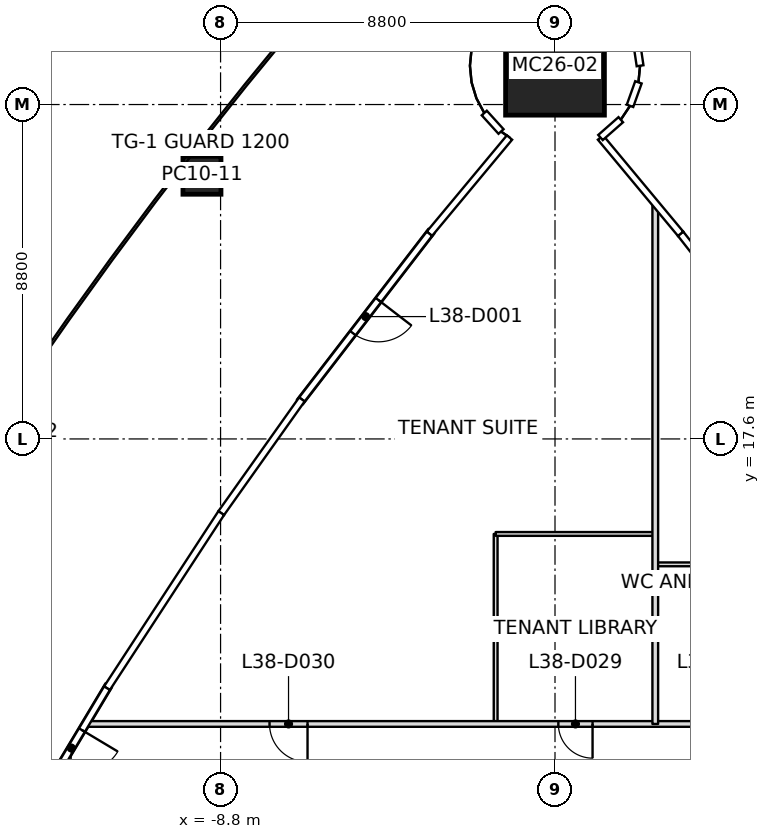
"""IFC4 building model, lengths in metres.
Left out: names, types, materials, properties, quantities, classifications, styles, units other than length and angle.
Written with IfcOpenShell. Run it as: python <this file> out.ifc"""

import sys

from ifc_helpers import new_model, si_unit, direction, frame, frame_2d, origin, origin_2d, place, context, subcontext, project, spatial, rectangle, extrude, element, fill, save


model = new_model("IFC4")
c1 = context("Model", 3, precision=1e-05, world=origin(), true_north=direction((0.0, 1.0)))
c2 = subcontext(c1, "Body", "Model", "MODEL_VIEW")
j1 = project(units=[si_unit("LENGTHUNIT", "METRE"), si_unit("PLANEANGLEUNIT", "RADIAN")], contexts=[c1])
p1 = place(None, origin())
s1 = spatial("IfcSite", under=j1, at=p1, CompositionType="ELEMENT")
p2 = place(p1, origin())
s2 = spatial("IfcBuilding", under=s1, at=p2, CompositionType="ELEMENT")
p3 = place(p2, frame((0.0, 0.0, 173.8)))
s3 = spatial("IfcBuildingStorey", under=s2, at=p3, CompositionType="ELEMENT", Elevation=173.8)
p4 = place(p3, frame((0.0, 27.421, 0.0), z_axis=(0.0, -0.032331720729, 0.999477193254), x_axis=(1.0, 0.0, 0.0)))
e1 = element("IfcColumn", 1, at=p4, inside=s3, PredefinedType="COLUMN", context=c2, shape_type="SweptSolid", body=[
    extrude(rectangle(XDim=2.6, YDim=2.6, at=origin_2d()), origin(), (0.0, 0.0, 1.0), 4.002),
])
p5 = place(p3, frame((-9.29, 24.539, 0.0), z_axis=(0.0002440896, -0.020442503975, 0.999791000385), x_axis=(0.611997816063, 0.790697226077, 0.016017796599)))
e2 = element("IfcColumn", 2, at=p5, inside=s3, PredefinedType="COLUMN", context=c2, shape_type="SweptSolid", body=[
    extrude(rectangle(XDim=1.0, YDim=1.0, at=origin_2d()), origin(), (0.0, 0.0, 1.0), 4.001),
])
p6 = place(p3, frame((-3.25, 23.071, 0.0), z_axis=(0.0, 0.0, 1.0), x_axis=(-0.609922556237, -0.792461024526, 0.0)))
e3 = element("IfcWall", 3, at=p6, inside=s3, PredefinedType="SOLIDWALL", context=c2, shape_type="SweptSolid", body=[
    extrude(rectangle(XDim=5.682, YDim=0.2, at=frame_2d((2.841, 0.0))), origin(), (0.0, 0.0, 1.0), 3.34),
])
p7 = place(p6, frame((2.291, 0.0, 0.0)))
e4 = element("IfcOpeningElement", 4, at=p7, cuts=e3, PredefinedType="OPENING", context=c2, shape_type="SweptSolid", body=[
    extrude(rectangle(XDim=1.1, YDim=2.1, at=frame_2d((0.55, 1.05))), frame((0.0, 0.1, 0.0), z_axis=(0.0, -1.0, 0.0), x_axis=(1.0, 0.0, 0.0)), (0.0, 0.0, 1.0), 0.2),
])
p8 = place(p3, frame((-11.742, 11.118, 0.0), z_axis=(0.0, 0.0, 1.0), x_axis=(-0.513422332631, -0.858136066341, 0.0)))
e5 = element("IfcWall", 5, at=p8, inside=s3, PredefinedType="SOLIDWALL", context=c2, shape_type="SweptSolid", body=[
    extrude(rectangle(XDim=3.848, YDim=0.2, at=frame_2d((1.924, 0.0))), origin(), (0.0, 0.0, 1.0), 3.34),
])
p9 = place(p8, frame((1.374, 0.0, 0.0)))
e6 = element("IfcOpeningElement", 6, at=p9, cuts=e5, PredefinedType="OPENING", context=c2, shape_type="SweptSolid", body=[
    extrude(rectangle(XDim=1.1, YDim=2.1, at=frame_2d((0.55, 1.05))), frame((0.0, 0.1, 0.0), z_axis=(0.0, -1.0, 0.0), x_axis=(1.0, 0.0, 0.0)), (0.0, 0.0, 1.0), 0.2),
])
p10 = place(p3, frame((2.638, 10.1, 0.0), z_axis=(0.0, 0.0, 1.0), x_axis=(0.0, 1.0, 0.0)))
e7 = element("IfcWall", 7, at=p10, inside=s3, PredefinedType="PARTITIONING", context=c2, shape_type="SweptSolid", body=[
    extrude(rectangle(XDim=13.711, YDim=0.15, at=frame_2d((6.856, 0.0))), origin(), (0.0, 0.0, 1.0), 3.247),
])
p11 = place(p3, frame((13.02, 10.1, 0.0), z_axis=(0.0, 0.0, 1.0), x_axis=(-1.0, 0.0, 0.0)))
e8 = element("IfcWall", 8, at=p11, inside=s3, PredefinedType="PARTITIONING", context=c2, shape_type="SweptSolid", body=[
    extrude(rectangle(XDim=25.382, YDim=0.15, at=frame_2d((12.691, 0.0))), origin(), (0.0, 0.0, 1.0), 3.166),
])
p12 = place(p11, frame((8.132, 0.0, 0.0)))
e9 = element("IfcOpeningElement", 9, at=p12, cuts=e8, PredefinedType="OPENING", context=c2, shape_type="SweptSolid", body=[
    extrude(rectangle(XDim=0.9, YDim=2.1, at=frame_2d((0.45, 1.05))), frame((0.0, 0.075, 0.0), z_axis=(0.0, -1.0, 0.0), x_axis=(1.0, 0.0, 0.0)), (0.0, 0.0, 1.0), 0.15),
])
p13 = place(p11, frame((2.791, 0.0, 0.0)))
e10 = element("IfcOpeningElement", 10, at=p13, cuts=e8, PredefinedType="OPENING", context=c2, shape_type="SweptSolid", body=[
    extrude(rectangle(XDim=1.0, YDim=2.1, at=frame_2d((0.5, 1.05))), frame((0.0, 0.075, 0.0), z_axis=(0.0, -1.0, 0.0), x_axis=(1.0, 0.0, 0.0)), (0.0, 0.0, 1.0), 0.15),
])
p14 = place(p11, frame((12.032, 0.0, 0.0)))
e11 = element("IfcOpeningElement", 11, at=p14, cuts=e8, PredefinedType="OPENING", context=c2, shape_type="SweptSolid", body=[
    extrude(rectangle(XDim=0.9, YDim=2.1, at=frame_2d((0.45, 1.05))), frame((0.0, 0.075, 0.0), z_axis=(0.0, -1.0, 0.0), x_axis=(1.0, 0.0, 0.0)), (0.0, 0.0, 1.0), 0.15),
])
p15 = place(p11, frame((19.532, 0.0, 0.0)))
e12 = element("IfcOpeningElement", 12, at=p15, cuts=e8, PredefinedType="OPENING", context=c2, shape_type="SweptSolid", body=[
    extrude(rectangle(XDim=1.0, YDim=2.1, at=frame_2d((0.5, 1.05))), frame((0.0, 0.075, 0.0), z_axis=(0.0, -1.0, 0.0), x_axis=(1.0, 0.0, 0.0)), (0.0, 0.0, 1.0), 0.15),
])
p16 = place(p3, frame((-1.562, 10.13, 0.0), z_axis=(0.0, 0.0, 1.0), x_axis=(0.0, 1.0, 0.0)))
e13 = element("IfcWall", 13, at=p16, inside=s3, PredefinedType="PARTITIONING", context=c2, shape_type="SweptSolid", body=[
    extrude(rectangle(XDim=4.97, YDim=0.1, at=frame_2d((2.485, 0.0))), origin(), (0.0, 0.0, 1.0), 3.247),
])
p17 = place(p3, frame((-1.562, 15.1, 0.0), z_axis=(0.0, 0.0, 1.0), x_axis=(1.0, 0.0, 0.0)))
e14 = element("IfcWall", 14, at=p17, inside=s3, PredefinedType="PARTITIONING", context=c2, shape_type="SweptSolid", body=[
    extrude(rectangle(XDim=4.17, YDim=0.1, at=frame_2d((2.085, 0.0))), origin(), (0.0, 0.0, 1.0), 3.166),
])
p18 = place(p3, frame((2.668, 14.3, 0.0), z_axis=(0.0, 0.0, 1.0), x_axis=(1.0, 0.0, 0.0)))
e15 = element("IfcWall", 15, at=p18, inside=s3, PredefinedType="PARTITIONING", context=c2, shape_type="SweptSolid", body=[
    extrude(rectangle(XDim=3.57, YDim=0.1, at=frame_2d((1.785, 0.0))), origin(), (0.0, 0.0, 1.0), 3.247),
])
p19 = place(p7, origin())
e16 = element("IfcDoor", 16, at=p19, inside=s3, OperationType="SINGLE_SWING_RIGHT", PredefinedType="DOOR", context=c2, shape_type="SweptSolid", body=[
    extrude(rectangle(XDim=1.1, YDim=2.1, at=frame_2d((0.55, 1.05))), frame((0.0, 0.025, 0.0), z_axis=(0.0, -1.0, 0.0), x_axis=(1.0, 0.0, 0.0)), (0.0, 0.0, 1.0), 0.05),
])
fill(e4, e16)
p20 = place(p9, origin())
e17 = element("IfcDoor", 17, at=p20, inside=s3, OperationType="SINGLE_SWING_LEFT", PredefinedType="DOOR", context=c2, shape_type="SweptSolid", body=[
    extrude(rectangle(XDim=1.1, YDim=2.1, at=frame_2d((0.55, 1.05))), frame((0.0, 0.025, 0.0), z_axis=(0.0, -1.0, 0.0), x_axis=(1.0, 0.0, 0.0)), (0.0, 0.0, 1.0), 0.05),
])
fill(e6, e17)
p21 = place(p14, origin())
e18 = element("IfcDoor", 18, at=p21, inside=s3, OperationType="SINGLE_SWING_LEFT", PredefinedType="DOOR", context=c2, shape_type="SweptSolid", body=[
    extrude(rectangle(XDim=0.9, YDim=2.1, at=frame_2d((0.45, 1.05))), frame((0.0, 0.025, 0.0), z_axis=(0.0, -1.0, 0.0), x_axis=(1.0, 0.0, 0.0)), (0.0, 0.0, 1.0), 0.05),
])
fill(e11, e18)
p22 = place(p15, origin())
e19 = element("IfcDoor", 19, at=p22, inside=s3, OperationType="SINGLE_SWING_RIGHT", PredefinedType="DOOR", context=c2, shape_type="SweptSolid", body=[
    extrude(rectangle(XDim=1.0, YDim=2.1, at=frame_2d((0.5, 1.05))), frame((0.0, 0.025, 0.0), z_axis=(0.0, -1.0, 0.0), x_axis=(1.0, 0.0, 0.0)), (0.0, 0.0, 1.0), 0.05),
])
fill(e12, e19)
save(model, sys.argv[1])
